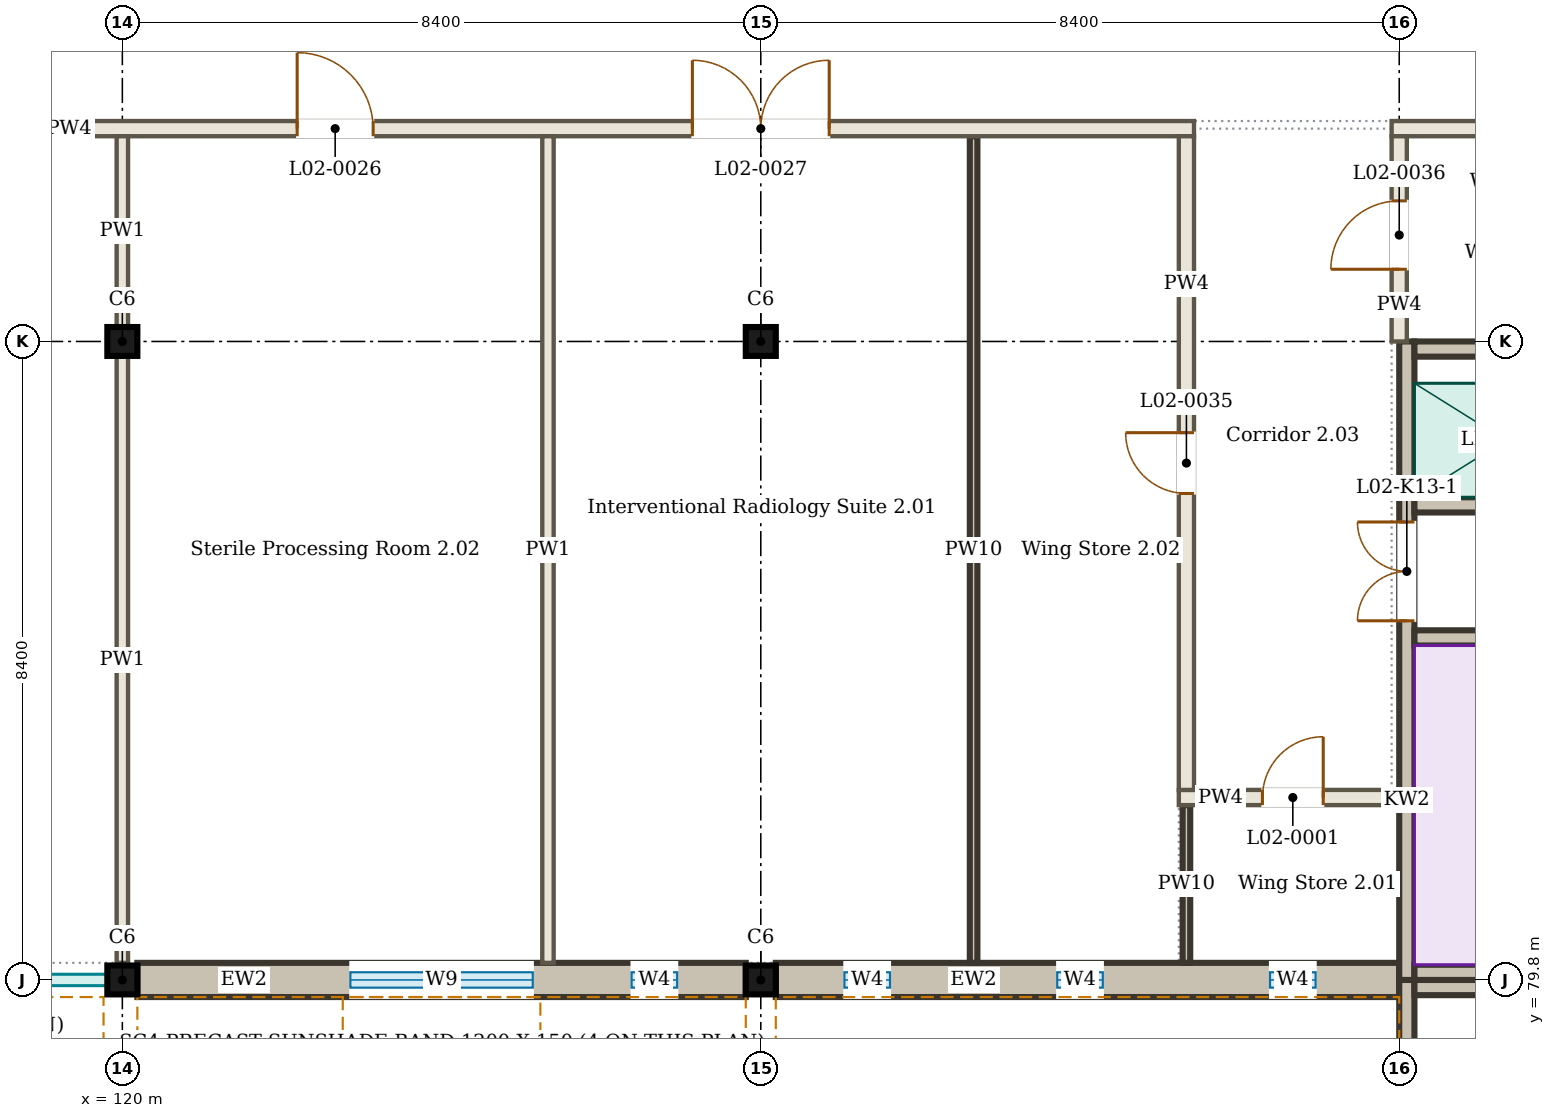
"""IFC4 building model, lengths in metres.
Left out: names, types, materials, properties, quantities, classifications, styles, units other than length and angle.
Written with IfcOpenShell. Run it as: python <this file> out.ifc"""

import sys

from ifc_helpers import new_model, si_unit, direction, frame, frame_2d, origin, origin_2d, place, context, subcontext, project, spatial, rectangle, i_section, extrude, element, fill, save


model = new_model("IFC4")
c1 = context("Model", 3, precision=1e-05, world=origin(), true_north=direction((0.0, 1.0)))
c2 = subcontext(c1, "Body", "Model", "MODEL_VIEW")
j1 = project(units=[si_unit("LENGTHUNIT", "METRE"), si_unit("PLANEANGLEUNIT", "RADIAN")], contexts=[c1])
p1 = place(None, origin())
s1 = spatial("IfcSite", under=j1, at=p1, CompositionType="ELEMENT")
p2 = place(p1, origin())
s2 = spatial("IfcBuilding", under=s1, at=p2, CompositionType="ELEMENT")
p3 = place(p2, frame((0.0, 0.0, 9.0)))
s3 = spatial("IfcBuildingStorey", under=s2, at=p3, CompositionType="ELEMENT", Elevation=9.0)
for number, where, z_axis, x_axis in (
    (1, (120.0, 79.8, 0.0), (0.0, 0.0, 1.0), (1.0, 0.0, 0.0)),
    (2, (128.4, 79.8, 0.0), (0.0, 0.0, 1.0), (1.0, 0.0, 0.0)),
    (3, (120.0, 88.2, 0.0), (0.0, 0.0, 1.0), (1.0, 0.0, 0.0)),
    (4, (128.4, 88.2, 0.0), (0.0, 0.0, 1.0), (1.0, 0.0, 0.0)),
):
    element("IfcColumn", number, at=place(p3, frame(where, z_axis=z_axis, x_axis=x_axis)), inside=s3, PredefinedType="COLUMN", context=c2, shape_type="SweptSolid", body=[
        extrude(i_section(OverallWidth=0.395, OverallDepth=0.38, WebThickness=0.019, FlangeThickness=0.03, FilletRadius=0.027, at=origin_2d()), origin(), (0.0, 0.0, 1.0), 4.5),
    ])
p4 = place(p3, frame((111.798, 79.64, 3.87), z_axis=(0.0, 0.0, 1.0), x_axis=(1.0, 0.0, 0.0)))
e5 = element("IfcWall", 5, at=p4, inside=s3, PredefinedType="SOLIDWALL", context=c2, shape_type="SweptSolid", body=[
    extrude(rectangle(XDim=8.005, YDim=0.13, at=frame_2d((4.002, 0.0))), origin(), (0.0, 0.0, 1.0), 0.63),
])
p5 = place(p3, frame((120.198, 79.8, 0.0), z_axis=(0.0, 0.0, 1.0), x_axis=(1.0, 0.0, 0.0)))
e6 = element("IfcWall", 6, at=p5, inside=s3, PredefinedType="SOLIDWALL", context=c2, shape_type="SweptSolid", body=[
    extrude(rectangle(XDim=8.005, YDim=0.45, at=frame_2d((4.002, 0.0))), origin(), (0.0, 0.0, 1.0), 3.85),
])
p6 = place(p5, frame((2.802, 0.0, 0.9)))
e7 = element("IfcOpeningElement", 7, at=p6, cuts=e6, PredefinedType="OPENING", context=c2, shape_type="SweptSolid", body=[
    extrude(rectangle(XDim=2.4, YDim=1.2, at=frame_2d((1.2, 0.6))), frame((0.0, 0.235, 0.0), z_axis=(0.0, -1.0, 0.0), x_axis=(1.0, 0.0, 0.0)), (0.0, 0.0, 1.0), 0.47),
])
p7 = place(p5, frame((6.502, 0.0, 2.1)))
e8 = element("IfcOpeningElement", 8, at=p7, cuts=e6, PredefinedType="OPENING", context=c2, shape_type="SweptSolid", body=[
    extrude(rectangle(XDim=0.6, YDim=1.2, at=frame_2d((0.3, 0.6))), frame((0.0, 0.235, 0.0), z_axis=(0.0, -1.0, 0.0), x_axis=(1.0, 0.0, 0.0)), (0.0, 0.0, 1.0), 0.47),
])
p8 = place(p3, frame((120.198, 79.64, 3.87), z_axis=(0.0, 0.0, 1.0), x_axis=(1.0, 0.0, 0.0)))
e9 = element("IfcWall", 9, at=p8, inside=s3, PredefinedType="SOLIDWALL", context=c2, shape_type="SweptSolid", body=[
    extrude(rectangle(XDim=8.005, YDim=0.13, at=frame_2d((4.002, 0.0))), origin(), (0.0, 0.0, 1.0), 0.63),
])
p9 = place(p3, frame((128.597, 79.8, 0.0), z_axis=(0.0, 0.0, 1.0), x_axis=(1.0, 0.0, 0.0)))
e10 = element("IfcWall", 10, at=p9, inside=s3, PredefinedType="SOLIDWALL", context=c2, shape_type="SweptSolid", body=[
    extrude(rectangle(XDim=8.203, YDim=0.45, at=frame_2d((4.101, 0.0))), origin(), (0.0, 0.0, 1.0), 3.85),
])
p10 = place(p9, frame((0.903, 0.0, 2.1)))
e11 = element("IfcOpeningElement", 11, at=p10, cuts=e10, PredefinedType="OPENING", context=c2, shape_type="SweptSolid", body=[
    extrude(rectangle(XDim=0.6, YDim=1.2, at=frame_2d((0.3, 0.6))), frame((0.0, 0.235, 0.0), z_axis=(0.0, -1.0, 0.0), x_axis=(1.0, 0.0, 0.0)), (0.0, 0.0, 1.0), 0.47),
])
p11 = place(p9, frame((3.702, 0.0, 2.1)))
e12 = element("IfcOpeningElement", 12, at=p11, cuts=e10, PredefinedType="OPENING", context=c2, shape_type="SweptSolid", body=[
    extrude(rectangle(XDim=0.6, YDim=1.2, at=frame_2d((0.3, 0.6))), frame((0.0, 0.235, 0.0), z_axis=(0.0, -1.0, 0.0), x_axis=(1.0, 0.0, 0.0)), (0.0, 0.0, 1.0), 0.47),
])
p12 = place(p9, frame((6.502, 0.0, 2.1)))
e13 = element("IfcOpeningElement", 13, at=p12, cuts=e10, PredefinedType="OPENING", context=c2, shape_type="SweptSolid", body=[
    extrude(rectangle(XDim=0.6, YDim=1.2, at=frame_2d((0.3, 0.6))), frame((0.0, 0.235, 0.0), z_axis=(0.0, -1.0, 0.0), x_axis=(1.0, 0.0, 0.0)), (0.0, 0.0, 1.0), 0.47),
])
p13 = place(p3, frame((128.597, 79.64, 3.87), z_axis=(0.0, 0.0, 1.0), x_axis=(1.0, 0.0, 0.0)))
e14 = element("IfcWall", 14, at=p13, inside=s3, PredefinedType="SOLIDWALL", context=c2, shape_type="SweptSolid", body=[
    extrude(rectangle(XDim=8.203, YDim=0.13, at=frame_2d((4.101, 0.0))), origin(), (0.0, 0.0, 1.0), 0.63),
])
p14 = place(p3, frame((133.9, 82.2, 0.0), z_axis=(0.0, 0.0, 1.0), x_axis=(1.0, 0.0, 0.0)))
e15 = element("IfcWall", 15, at=p14, inside=s3, PredefinedType="PARTITIONING", context=c2, shape_type="SweptSolid", body=[
    extrude(rectangle(XDim=2.9, YDim=0.2, at=frame_2d((1.45, 0.0))), origin(), (0.0, 0.0, 1.0), 3.95),
])
p15 = place(p14, frame((1.1, 0.0, 0.0)))
e16 = element("IfcOpeningElement", 16, at=p15, cuts=e15, PredefinedType="OPENING", context=c2, shape_type="SweptSolid", body=[
    extrude(rectangle(XDim=0.8, YDim=2.1, at=frame_2d((0.4, 1.05))), frame((0.0, 0.11, 0.0), z_axis=(0.0, -1.0, 0.0), x_axis=(1.0, 0.0, 0.0)), (0.0, 0.0, 1.0), 0.22),
])
p16 = place(p3, frame((111.6, 91.0, 0.0), z_axis=(0.0, 0.0, 1.0), x_axis=(1.0, 0.0, 0.0)))
e17 = element("IfcWall", 17, at=p16, inside=s3, PredefinedType="PARTITIONING", context=c2, shape_type="SweptSolid", body=[
    extrude(rectangle(XDim=22.5, YDim=0.2, at=frame_2d((11.25, 0.0))), origin(), (0.0, 0.0, 1.0), 3.8),
])
p17 = place(p16, frame((3.7, 0.0, 0.0)))
e18 = element("IfcOpeningElement", 18, at=p17, cuts=e17, PredefinedType="OPENING", context=c2, shape_type="SweptSolid", body=[
    extrude(rectangle(XDim=1.0, YDim=2.1, at=frame_2d((0.5, 1.05))), frame((0.0, 0.11, 0.0), z_axis=(0.0, -1.0, 0.0), x_axis=(1.0, 0.0, 0.0)), (0.0, 0.0, 1.0), 0.22),
])
p18 = place(p16, frame((10.7, 0.0, 0.0)))
e19 = element("IfcOpeningElement", 19, at=p18, cuts=e17, PredefinedType="OPENING", context=c2, shape_type="SweptSolid", body=[
    extrude(rectangle(XDim=1.0, YDim=2.1, at=frame_2d((0.5, 1.05))), frame((0.0, 0.11, 0.0), z_axis=(0.0, -1.0, 0.0), x_axis=(1.0, 0.0, 0.0)), (0.0, 0.0, 1.0), 0.22),
])
p19 = place(p16, frame((15.9, 0.0, 0.0)))
e20 = element("IfcOpeningElement", 20, at=p19, cuts=e17, PredefinedType="OPENING", context=c2, shape_type="SweptSolid", body=[
    extrude(rectangle(XDim=1.8, YDim=2.1, at=frame_2d((0.9, 1.05))), frame((0.0, 0.11, 0.0), z_axis=(0.0, -1.0, 0.0), x_axis=(1.0, 0.0, 0.0)), (0.0, 0.0, 1.0), 0.22),
])
p20 = place(p3, frame((136.7, 91.0, 0.0), z_axis=(0.0, 0.0, 1.0), x_axis=(1.0, 0.0, 0.0)))
e21 = element("IfcWall", 21, at=p20, inside=s3, PredefinedType="PARTITIONING", context=c2, shape_type="SweptSolid", body=[
    extrude(rectangle(XDim=5.8, YDim=0.2, at=frame_2d((2.9, 0.0))), origin(), (0.0, 0.0, 1.0), 3.8),
])
p21 = place(p20, frame((3.85, 0.0, 0.0)))
e22 = element("IfcOpeningElement", 22, at=p21, cuts=e21, PredefinedType="OPENING", context=c2, shape_type="SweptSolid", body=[
    extrude(rectangle(XDim=0.9, YDim=2.1, at=frame_2d((0.45, 1.05))), frame((0.0, 0.11, 0.0), z_axis=(0.0, -1.0, 0.0), x_axis=(1.0, 0.0, 0.0)), (0.0, 0.0, 1.0), 0.22),
])
p22 = place(p3, frame((120.0, 80.025, 0.0), z_axis=(0.0, 0.0, 1.0), x_axis=(0.0, 1.0, 0.0)))
e23 = element("IfcWall", 23, at=p22, inside=s3, PredefinedType="PARTITIONING", context=c2, shape_type="SweptSolid", body=[
    extrude(rectangle(XDim=7.978, YDim=0.15, at=frame_2d((3.989, 0.0))), origin(), (0.0, 0.0, 1.0), 3.8),
])
p23 = place(p3, frame((120.0, 88.397, 0.0), z_axis=(0.0, 0.0, 1.0), x_axis=(0.0, 1.0, 0.0)))
e24 = element("IfcWall", 24, at=p23, inside=s3, PredefinedType="PARTITIONING", context=c2, shape_type="SweptSolid", body=[
    extrude(rectangle(XDim=2.502, YDim=0.15, at=frame_2d((1.251, 0.0))), origin(), (0.0, 0.0, 1.0), 3.8),
])
p24 = place(p3, frame((125.6, 80.025, 0.0), z_axis=(0.0, 0.0, 1.0), x_axis=(0.0, 1.0, 0.0)))
e25 = element("IfcWall", 25, at=p24, inside=s3, PredefinedType="PARTITIONING", context=c2, shape_type="SweptSolid", body=[
    extrude(rectangle(XDim=10.875, YDim=0.15, at=frame_2d((5.438, 0.0))), origin(), (0.0, 0.0, 1.0), 3.8),
])
p25 = place(p3, frame((131.2, 80.025, 0.0), z_axis=(0.0, 0.0, 1.0), x_axis=(0.0, 1.0, 0.0)))
e26 = element("IfcWall", 26, at=p25, inside=s3, PredefinedType="SOLIDWALL", context=c2, shape_type="SweptSolid", body=[
    extrude(rectangle(XDim=10.875, YDim=0.1, at=frame_2d((5.438, 0.0))), origin(), (0.0, 0.0, 1.0), 3.8),
])
p26 = place(p3, frame((134.0, 80.025, 0.0), z_axis=(0.0, 0.0, 1.0), x_axis=(0.0, 1.0, 0.0)))
e27 = element("IfcWall", 27, at=p26, inside=s3, PredefinedType="SOLIDWALL", context=c2, shape_type="SweptSolid", body=[
    extrude(rectangle(XDim=2.075, YDim=0.1, at=frame_2d((1.038, 0.0))), origin(), (0.0, 0.0, 1.0), 3.95),
])
p27 = place(p3, frame((134.0, 82.3, 0.0), z_axis=(0.0, 0.0, 1.0), x_axis=(0.0, 1.0, 0.0)))
e28 = element("IfcWall", 28, at=p27, inside=s3, PredefinedType="PARTITIONING", context=c2, shape_type="SweptSolid", body=[
    extrude(rectangle(XDim=8.6, YDim=0.2, at=frame_2d((4.3, 0.0))), origin(), (0.0, 0.0, 1.0), 3.8),
])
p28 = place(p27, frame((3.9, 0.0, 0.0)))
e29 = element("IfcOpeningElement", 29, at=p28, cuts=e28, PredefinedType="OPENING", context=c2, shape_type="SweptSolid", body=[
    extrude(rectangle(XDim=0.8, YDim=2.1, at=frame_2d((0.4, 1.05))), frame((0.0, 0.11, 0.0), z_axis=(0.0, -1.0, 0.0), x_axis=(1.0, 0.0, 0.0)), (0.0, 0.0, 1.0), 0.22),
])
p29 = place(p3, frame((136.8, 88.2, 0.0), z_axis=(0.0, 0.0, 1.0), x_axis=(0.0, 1.0, 0.0)))
e30 = element("IfcWall", 30, at=p29, inside=s3, PredefinedType="PARTITIONING", context=c2, shape_type="SweptSolid", body=[
    extrude(rectangle(XDim=2.7, YDim=0.2, at=frame_2d((1.35, 0.0))), origin(), (0.0, 0.0, 1.0), 3.8),
])
p30 = place(p29, frame((0.95, 0.0, 0.0)))
e31 = element("IfcOpeningElement", 31, at=p30, cuts=e30, PredefinedType="OPENING", context=c2, shape_type="SweptSolid", body=[
    extrude(rectangle(XDim=0.9, YDim=2.1, at=frame_2d((0.45, 1.05))), frame((0.0, 0.11, 0.0), z_axis=(0.0, -1.0, 0.0), x_axis=(1.0, 0.0, 0.0)), (0.0, 0.0, 1.0), 0.22),
])
p31 = place(p3, frame((136.9, 77.55, 0.0), z_axis=(0.0, 0.0, 1.0), x_axis=(0.0, 1.0, 0.0)))
e32 = element("IfcWall", 32, at=p31, inside=s3, PredefinedType="SOLIDWALL", context=c2, shape_type="SweptSolid", body=[
    extrude(rectangle(XDim=2.25, YDim=0.2, at=frame_2d((1.125, 0.0))), origin(), (0.0, 0.0, 1.0), 1.3),
])
p32 = place(p3, frame((137.0, 79.7, 0.0), z_axis=(0.0, 0.0, 1.0), x_axis=(1.0, 0.0, 0.0)))
e33 = element("IfcWall", 33, at=p32, inside=s3, PredefinedType="SOLIDWALL", context=c2, shape_type="SweptSolid", body=[
    extrude(rectangle(XDim=2.95, YDim=0.2, at=frame_2d((1.475, 0.0))), origin(), (0.0, 0.0, 1.0), 1.3),
])
p33 = place(p3, frame((136.9, 79.8, 0.0), z_axis=(0.0, 0.0, 1.0), x_axis=(0.0, 1.0, 0.0)))
e34 = element("IfcWall", 34, at=p33, inside=s3, PredefinedType="SOLIDWALL", context=c2, shape_type="SweptSolid", body=[
    extrude(rectangle(XDim=8.4, YDim=0.2, at=frame_2d((4.2, 0.0))), origin(), (0.0, 0.0, 1.0), 4.5),
])
p34 = place(p33, frame((4.725, 0.0, 0.0)))
e35 = element("IfcOpeningElement", 35, at=p34, cuts=e34, PredefinedType="OPENING", context=c2, shape_type="SweptSolid", body=[
    extrude(rectangle(XDim=1.3, YDim=2.1, at=frame_2d((0.65, 1.05))), frame((0.0, 0.11, 0.0), z_axis=(0.0, -1.0, 0.0), x_axis=(1.0, 0.0, 0.0)), (0.0, 0.0, 1.0), 0.22),
])
for number, where, z_axis, x_axis in (
    (36, (137.0, 79.9, 0.0), (0.0, 0.0, 1.0), (1.0, 0.0, 0.0)),
    (37, (137.0, 88.1, 0.0), (0.0, 0.0, 1.0), (1.0, 0.0, 0.0)),
):
    element("IfcWall", number, at=place(p3, frame(where, z_axis=z_axis, x_axis=x_axis)), inside=s3, PredefinedType="SOLIDWALL", context=c2, shape_type="SweptSolid", body=[
        extrude(rectangle(XDim=7.975, YDim=0.2, at=frame_2d((3.988, 0.0))), origin(), (0.0, 0.0, 1.0), 4.5),
    ])
p35 = place(p3, frame((137.0, 84.3, 0.0), z_axis=(0.0, 0.0, 1.0), x_axis=(1.0, 0.0, 0.0)))
e38 = element("IfcWall", 38, at=p35, inside=s3, PredefinedType="SOLIDWALL", context=c2, shape_type="SweptSolid", body=[
    extrude(rectangle(XDim=7.975, YDim=0.2, at=frame_2d((3.988, 0.0))), origin(), (0.0, 0.0, 1.0), 4.5),
])
p36 = place(p35, frame((6.538, 0.0, 0.0)))
e39 = element("IfcOpeningElement", 39, at=p36, cuts=e38, PredefinedType="OPENING", context=c2, shape_type="SweptSolid", body=[
    extrude(rectangle(XDim=1.1, YDim=2.1, at=frame_2d((0.55, 1.05))), frame((0.0, 0.11, 0.0), z_axis=(0.0, -1.0, 0.0), x_axis=(1.0, 0.0, 0.0)), (0.0, 0.0, 1.0), 0.22),
])
p37 = place(p3, frame((137.0, 86.05, 0.0), z_axis=(0.0, 0.0, 1.0), x_axis=(1.0, 0.0, 0.0)))
e40 = element("IfcWall", 40, at=p37, inside=s3, PredefinedType="SOLIDWALL", context=c2, shape_type="SweptSolid", body=[
    extrude(rectangle(XDim=2.95, YDim=0.2, at=frame_2d((1.475, 0.0))), origin(), (0.0, 0.0, 1.0), 4.5),
])
p38 = place(p6, origin())
e41 = element("IfcWindow", 41, at=p38, inside=s3, PartitioningType="SINGLE_PANEL", PredefinedType="WINDOW", context=c2, shape_type="SweptSolid", body=[
    extrude(rectangle(XDim=2.4, YDim=1.2, at=frame_2d((1.2, 0.6))), frame((0.0, 0.03, 0.0), z_axis=(0.0, -1.0, 0.0), x_axis=(1.0, 0.0, 0.0)), (0.0, 0.0, 1.0), 0.06),
])
fill(e7, e41)
p39 = place(p7, origin())
e42 = element("IfcWindow", 42, at=p39, inside=s3, PartitioningType="SINGLE_PANEL", PredefinedType="WINDOW", context=c2, shape_type="SweptSolid", body=[
    extrude(rectangle(XDim=0.6, YDim=1.2, at=frame_2d((0.3, 0.6))), frame((0.0, 0.135, 0.0), z_axis=(0.0, -1.0, 0.0), x_axis=(1.0, 0.0, 0.0)), (0.0, 0.0, 1.0), 0.06),
])
fill(e8, e42)
p40 = place(p10, origin())
e43 = element("IfcWindow", 43, at=p40, inside=s3, PartitioningType="SINGLE_PANEL", PredefinedType="WINDOW", context=c2, shape_type="SweptSolid", body=[
    extrude(rectangle(XDim=0.6, YDim=1.2, at=frame_2d((0.3, 0.6))), frame((0.0, 0.135, 0.0), z_axis=(0.0, -1.0, 0.0), x_axis=(1.0, 0.0, 0.0)), (0.0, 0.0, 1.0), 0.06),
])
fill(e11, e43)
p41 = place(p11, origin())
e44 = element("IfcWindow", 44, at=p41, inside=s3, PartitioningType="SINGLE_PANEL", PredefinedType="WINDOW", context=c2, shape_type="SweptSolid", body=[
    extrude(rectangle(XDim=0.6, YDim=1.2, at=frame_2d((0.3, 0.6))), frame((0.0, 0.135, 0.0), z_axis=(0.0, -1.0, 0.0), x_axis=(1.0, 0.0, 0.0)), (0.0, 0.0, 1.0), 0.06),
])
fill(e12, e44)
p42 = place(p12, origin())
e45 = element("IfcWindow", 45, at=p42, inside=s3, PartitioningType="SINGLE_PANEL", PredefinedType="WINDOW", context=c2, shape_type="SweptSolid", body=[
    extrude(rectangle(XDim=0.6, YDim=1.2, at=frame_2d((0.3, 0.6))), frame((0.0, 0.135, 0.0), z_axis=(0.0, -1.0, 0.0), x_axis=(1.0, 0.0, 0.0)), (0.0, 0.0, 1.0), 0.06),
])
fill(e13, e45)
p43 = place(p15, origin())
e46 = element("IfcDoor", 46, at=p43, inside=s3, OperationType="SINGLE_SWING_RIGHT", PredefinedType="DOOR", context=c2, shape_type="SweptSolid", body=[
    extrude(rectangle(XDim=0.8, YDim=2.1, at=frame_2d((0.4, 1.05))), frame((0.0, 0.025, 0.0), z_axis=(0.0, -1.0, 0.0), x_axis=(1.0, 0.0, 0.0)), (0.0, 0.0, 1.0), 0.05),
])
fill(e16, e46)
p44 = place(p18, origin())
e47 = element("IfcDoor", 47, at=p44, inside=s3, OperationType="SINGLE_SWING_LEFT", PredefinedType="DOOR", context=c2, shape_type="SweptSolid", body=[
    extrude(rectangle(XDim=1.0, YDim=2.1, at=frame_2d((0.5, 1.05))), frame((0.0, 0.025, 0.0), z_axis=(0.0, -1.0, 0.0), x_axis=(1.0, 0.0, 0.0)), (0.0, 0.0, 1.0), 0.05),
])
fill(e19, e47)
p45 = place(p19, origin())
e48 = element("IfcDoor", 48, at=p45, inside=s3, OperationType="DOUBLE_DOOR_SINGLE_SWING", PredefinedType="DOOR", context=c2, shape_type="SweptSolid", body=[
    extrude(rectangle(XDim=1.8, YDim=2.1, at=frame_2d((0.9, 1.05))), frame((0.0, 0.025, 0.0), z_axis=(0.0, -1.0, 0.0), x_axis=(1.0, 0.0, 0.0)), (0.0, 0.0, 1.0), 0.05),
])
fill(e20, e48)
p46 = place(p28, origin())
e49 = element("IfcDoor", 49, at=p46, inside=s3, OperationType="SINGLE_SWING_RIGHT", PredefinedType="DOOR", context=c2, shape_type="SweptSolid", body=[
    extrude(rectangle(XDim=0.8, YDim=2.1, at=frame_2d((0.4, 1.05))), frame((0.0, 0.025, 0.0), z_axis=(0.0, -1.0, 0.0), x_axis=(1.0, 0.0, 0.0)), (0.0, 0.0, 1.0), 0.05),
])
fill(e29, e49)
p47 = place(p30, origin())
e50 = element("IfcDoor", 50, at=p47, inside=s3, OperationType="SINGLE_SWING_LEFT", PredefinedType="DOOR", context=c2, shape_type="SweptSolid", body=[
    extrude(rectangle(XDim=0.9, YDim=2.1, at=frame_2d((0.45, 1.05))), frame((0.0, 0.025, 0.0), z_axis=(0.0, -1.0, 0.0), x_axis=(1.0, 0.0, 0.0)), (0.0, 0.0, 1.0), 0.05),
])
fill(e31, e50)
p48 = place(p34, origin())
e51 = element("IfcDoor", 51, at=p48, inside=s3, OperationType="DOUBLE_DOOR_DOUBLE_SWING", PredefinedType="DOOR", context=c2, shape_type="SweptSolid", body=[
    extrude(rectangle(XDim=1.3, YDim=2.1, at=frame_2d((0.65, 1.05))), frame((0.0, 0.025, 0.0), z_axis=(0.0, -1.0, 0.0), x_axis=(1.0, 0.0, 0.0)), (0.0, 0.0, 1.0), 0.05),
])
fill(e35, e51)
save(model, sys.argv[1])
